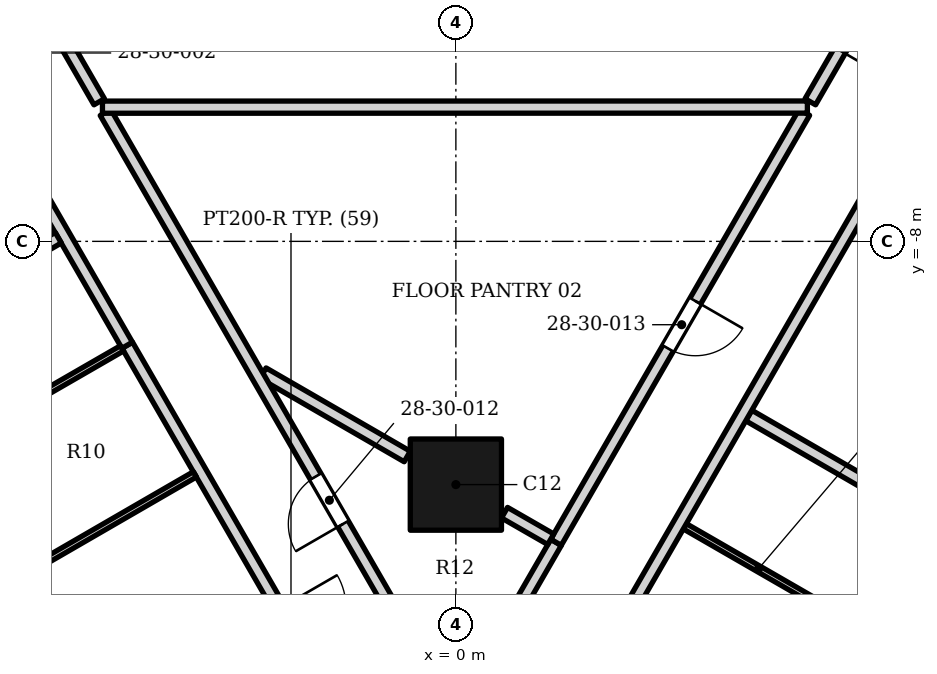
"""IFC4 building model, lengths in metres.
Left out: names, types, materials, properties, quantities, classifications, styles, units other than length and angle.
Written with IfcOpenShell. Run it as: python <this file> out.ifc"""

import sys

from ifc_helpers import new_model, si_unit, direction, frame, frame_2d, origin, origin_2d, place, context, subcontext, project, spatial, rectangle, extrude, element, fill, save


model = new_model("IFC4")
c1 = context("Model", 3, precision=1e-05, world=origin(), true_north=direction((0.0, 1.0)))
c2 = subcontext(c1, "Body", "Model", "MODEL_VIEW")
j1 = project(units=[si_unit("LENGTHUNIT", "METRE"), si_unit("PLANEANGLEUNIT", "RADIAN")], contexts=[c1])
p1 = place(None, origin())
s1 = spatial("IfcSite", under=j1, at=p1, CompositionType="ELEMENT")
p2 = place(p1, origin())
s2 = spatial("IfcBuilding", under=s1, at=p2, CompositionType="ELEMENT")
p3 = place(p2, frame((0.0, 0.0, 122.4)))
s3 = spatial("IfcBuildingStorey", under=s2, at=p3, CompositionType="ELEMENT", Elevation=122.4)
p4 = place(p3, frame((0.0, -12.0, 0.0), z_axis=(0.0, 0.0, 1.0), x_axis=(1.0, 0.0, 0.0)))
e1 = element("IfcColumn", 1, at=p4, inside=s3, PredefinedType="COLUMN", context=c2, shape_type="SweptSolid", body=[
    extrude(rectangle(XDim=1.5, YDim=1.5, at=origin_2d()), origin(), (0.0, 0.0, 1.0), 3.4),
])
p5 = place(p3, frame((-5.405, -9.708, 0.0), z_axis=(0.0, 0.0, 1.0), x_axis=(0.500010215181, -0.866019505967, 0.0)))
e2 = element("IfcWall", 2, at=p5, inside=s3, PredefinedType="PARTITIONING", context=c2, shape_type="SweptSolid", body=[
    extrude(rectangle(XDim=10.771, YDim=0.2, at=frame_2d((5.386, 0.0))), origin(), (0.0, 0.0, 1.0), 2.242),
])
p6 = place(p5, frame((5.0, 0.0, 0.0)))
e3 = element("IfcOpeningElement", 3, at=p6, cuts=e2, PredefinedType="OPENING", context=c2, shape_type="SweptSolid", body=[
    extrude(rectangle(XDim=1.1, YDim=2.1, at=frame_2d((0.55, 1.05))), frame((0.0, 0.11, 0.0), z_axis=(0.0, -1.0, 0.0), x_axis=(1.0, 0.0, 0.0)), (0.0, 0.0, 1.0), 0.22),
])
p7 = place(p5, frame((8.286, 0.0, 0.0)))
e4 = element("IfcOpeningElement", 4, at=p7, cuts=e2, PredefinedType="OPENING", context=c2, shape_type="SweptSolid", body=[
    extrude(rectangle(XDim=1.1, YDim=2.1, at=frame_2d((0.55, 1.05))), frame((0.0, 0.11, 0.0), z_axis=(0.0, -1.0, 0.0), x_axis=(1.0, 0.0, 0.0)), (0.0, 0.0, 1.0), 0.22),
])
p8 = place(p3, frame((0.033, -15.748, 0.0), z_axis=(0.0, 0.0, 1.0), x_axis=(0.50002566634, 0.866010584809, 0.0)))
e5 = element("IfcWall", 5, at=p8, inside=s3, PredefinedType="PARTITIONING", context=c2, shape_type="SweptSolid", body=[
    extrude(rectangle(XDim=3.229, YDim=0.2, at=frame_2d((1.615, 0.0))), origin(), (0.0, 0.0, 1.0), 2.474),
])
p9 = place(p3, frame((-8.49, -14.26, 0.0), z_axis=(0.0, 0.0, 1.0), x_axis=(0.86557903767, 0.500772333047, 0.0)))
e6 = element("IfcWall", 6, at=p9, inside=s3, PredefinedType="PARTITIONING", context=c2, shape_type="SweptSolid", body=[
    extrude(rectangle(XDim=4.85, YDim=0.1, at=frame_2d((2.425, 0.0))), origin(), (0.0, 0.0, 1.0), 2.242),
])
p10 = place(p9, frame((0.7, 0.0, 0.0)))
e7 = element("IfcOpeningElement", 7, at=p10, cuts=e6, PredefinedType="OPENING", context=c2, shape_type="SweptSolid", body=[
    extrude(rectangle(XDim=0.9, YDim=2.1, at=frame_2d((0.45, 1.05))), frame((0.0, 0.06, 0.0), z_axis=(0.0, -1.0, 0.0), x_axis=(1.0, 0.0, 0.0)), (0.0, 0.0, 1.0), 0.12),
])
p11 = place(p3, frame((3.764, -12.685, 0.0), z_axis=(0.0, 0.0, 1.0), x_axis=(0.866326367614, -0.499478352661, 0.0)))
e8 = element("IfcWall", 8, at=p11, inside=s3, PredefinedType="PARTITIONING", context=c2, shape_type="SweptSolid", body=[
    extrude(rectangle(XDim=2.8, YDim=0.1, at=frame_2d((1.4, 0.0))), origin(), (0.0, 0.0, 1.0), 2.384),
])
p12 = place(p3, frame((1.647, -12.948, 0.0), z_axis=(0.0, 0.0, 1.0), x_axis=(0.500209850425, 0.865904212681, 0.0)))
e9 = element("IfcWall", 9, at=p12, inside=s3, PredefinedType="PARTITIONING", context=c2, shape_type="SweptSolid", body=[
    extrude(rectangle(XDim=8.166, YDim=0.2, at=frame_2d((4.083, 0.0))), origin(), (0.0, 0.0, 1.0), 2.242),
])
p13 = place(p12, frame((3.682, 0.0, 0.0)))
e10 = element("IfcOpeningElement", 10, at=p13, cuts=e9, PredefinedType="OPENING", context=c2, shape_type="SweptSolid", body=[
    extrude(rectangle(XDim=0.9, YDim=2.1, at=frame_2d((0.45, 1.05))), frame((0.0, 0.11, 0.0), z_axis=(0.0, -1.0, 0.0), x_axis=(1.0, 0.0, 0.0)), (0.0, 0.0, 1.0), 0.22),
])
p14 = place(p3, frame((0.8, -12.462, 0.0), z_axis=(0.0, 0.0, 1.0), x_axis=(0.866903294585, -0.498476356347, 0.0)))
e11 = element("IfcWall", 11, at=p14, inside=s3, PredefinedType="PARTITIONING", context=c2, shape_type="SweptSolid", body=[
    extrude(rectangle(XDim=0.877, YDim=0.2, at=frame_2d((0.438, 0.0))), origin(), (0.0, 0.0, 1.0), 3.23),
])
p15 = place(p3, frame((4.816, -10.864, 0.0), z_axis=(0.0, 0.0, 1.0), x_axis=(0.865863825321, -0.500279757735, 0.0)))
e12 = element("IfcWall", 12, at=p15, inside=s3, PredefinedType="PARTITIONING", context=c2, shape_type="SweptSolid", body=[
    extrude(rectangle(XDim=5.65, YDim=0.2, at=frame_2d((2.825, 0.0))), origin(), (0.0, 0.0, 1.0), 2.242),
])
p16 = place(p3, frame((-3.171, -10.168, 0.0), z_axis=(0.0, 0.0, 1.0), x_axis=(0.865863357012, -0.500280568265, 0.0)))
e13 = element("IfcWall", 13, at=p16, inside=s3, PredefinedType="PARTITIONING", context=c2, shape_type="SweptSolid", body=[
    extrude(rectangle(XDim=2.739, YDim=0.2, at=frame_2d((1.369, 0.0))), origin(), (0.0, 0.0, 1.0), 2.242),
])
p17 = place(p3, frame((-7.914, -11.157, 0.0), z_axis=(0.0, 0.0, 1.0), x_axis=(0.866288634608, 0.499543793424, 0.0)))
e14 = element("IfcWall", 14, at=p17, inside=s3, PredefinedType="PARTITIONING", context=c2, shape_type="SweptSolid", body=[
    extrude(rectangle(XDim=2.8, YDim=0.1, at=frame_2d((1.4, 0.0))), origin(), (0.0, 0.0, 1.0), 2.242),
])
p18 = place(p3, frame((-13.143, 3.7, 0.0), z_axis=(0.0, 0.0, 1.0), x_axis=(0.499816656841, -0.866131231133, 0.0)))
e15 = element("IfcWall", 15, at=p18, inside=s3, PredefinedType="PARTITIONING", context=c2, shape_type="SweptSolid", body=[
    extrude(rectangle(XDim=15.48, YDim=0.2, at=frame_2d((7.74, 0.0))), origin(), (0.0, 0.0, 1.0), 2.242),
])
p19 = place(p18, frame((3.64, 0.0, 0.0)))
e16 = element("IfcOpeningElement", 16, at=p19, cuts=e15, PredefinedType="OPENING", context=c2, shape_type="SweptSolid", body=[
    extrude(rectangle(XDim=1.6, YDim=2.1, at=frame_2d((0.8, 1.05))), frame((0.0, 0.11, 0.0), z_axis=(0.0, -1.0, 0.0), x_axis=(1.0, 0.0, 0.0)), (0.0, 0.0, 1.0), 0.22),
])
p20 = place(p18, frame((9.381, 0.0, 0.0)))
e17 = element("IfcOpeningElement", 17, at=p20, cuts=e15, PredefinedType="OPENING", context=c2, shape_type="SweptSolid", body=[
    extrude(rectangle(XDim=1.1, YDim=2.1, at=frame_2d((0.55, 1.05))), frame((0.0, 0.11, 0.0), z_axis=(0.0, -1.0, 0.0), x_axis=(1.0, 0.0, 0.0)), (0.0, 0.0, 1.0), 0.22),
])
p21 = place(p3, frame((-10.74, -10.363, 0.0), z_axis=(0.0, 0.0, 1.0), x_axis=(0.866231677814, 0.499642552583, 0.0)))
e18 = element("IfcWall", 18, at=p21, inside=s3, PredefinedType="PARTITIONING", context=c2, shape_type="SweptSolid", body=[
    extrude(rectangle(XDim=4.85, YDim=0.2, at=frame_2d((2.425, 0.0))), origin(), (0.0, 0.0, 1.0), 2.242),
])
p22 = place(p3, frame((-5.763, -5.88, 0.0), z_axis=(0.0, 0.0, 1.0), x_axis=(0.500006842847, -0.866021453029, 0.0)))
e19 = element("IfcWall", 19, at=p22, inside=s3, PredefinedType="PARTITIONING", context=c2, shape_type="SweptSolid", body=[
    extrude(rectangle(XDim=11.493, YDim=0.2, at=frame_2d((5.747, 0.0))), origin(), (0.0, 0.0, 1.0), 2.242),
])
p23 = place(p22, frame((6.914, 0.0, 0.0)))
e20 = element("IfcOpeningElement", 20, at=p23, cuts=e19, PredefinedType="OPENING", context=c2, shape_type="SweptSolid", body=[
    extrude(rectangle(XDim=0.9, YDim=2.1, at=frame_2d((0.45, 1.05))), frame((0.0, 0.11, 0.0), z_axis=(0.0, -1.0, 0.0), x_axis=(1.0, 0.0, 0.0)), (0.0, 0.0, 1.0), 0.22),
])
p24 = place(p3, frame((-5.812, -5.793, 0.0), z_axis=(0.0, 0.0, 1.0), x_axis=(0.999999989135, 0.000147408763, 0.0)))
e21 = element("IfcWall", 21, at=p24, inside=s3, PredefinedType="PARTITIONING", context=c2, shape_type="SweptSolid", body=[
    extrude(rectangle(XDim=11.594, YDim=0.2, at=frame_2d((5.797, 0.0))), origin(), (0.0, 0.0, 1.0), 3.23),
])
p25 = place(p3, frame((5.829, -5.705, 0.0), z_axis=(0.0, 0.0, 1.0), x_axis=(0.500142759665, 0.865942965763, 0.0)))
e22 = element("IfcWall", 22, at=p25, inside=s3, PredefinedType="PARTITIONING", context=c2, shape_type="SweptSolid", body=[
    extrude(rectangle(XDim=10.86, YDim=0.2, at=frame_2d((5.43, 0.0))), origin(), (0.0, 0.0, 1.0), 2.242),
])
p26 = place(p25, frame((6.768, 0.0, 0.0)))
e23 = element("IfcOpeningElement", 23, at=p26, cuts=e22, PredefinedType="OPENING", context=c2, shape_type="SweptSolid", body=[
    extrude(rectangle(XDim=1.0, YDim=2.1, at=frame_2d((0.5, 1.05))), frame((0.0, 0.11, 0.0), z_axis=(0.0, -1.0, 0.0), x_axis=(1.0, 0.0, 0.0)), (0.0, 0.0, 1.0), 0.22),
])
p27 = place(p25, frame((3.563, 0.0, 0.0)))
e24 = element("IfcOpeningElement", 24, at=p27, cuts=e22, PredefinedType="OPENING", context=c2, shape_type="SweptSolid", body=[
    extrude(rectangle(XDim=1.0, YDim=2.1, at=frame_2d((0.5, 1.05))), frame((0.0, 0.11, 0.0), z_axis=(0.0, -1.0, 0.0), x_axis=(1.0, 0.0, 0.0)), (0.0, 0.0, 1.0), 0.22),
])
p28 = place(p3, frame((-11.295, 3.7, 0.0), z_axis=(0.0, 0.0, 1.0), x_axis=(0.500007885066, -0.866020851292, 0.0)))
e25 = element("IfcWall", 25, at=p28, inside=s3, PredefinedType="PARTITIONING", context=c2, shape_type="SweptSolid", body=[
    extrude(rectangle(XDim=10.859, YDim=0.2, at=frame_2d((5.43, 0.0))), origin(), (0.0, 0.0, 1.0), 2.242),
])
p29 = place(p3, frame((0.23, -18.61, 0.0), z_axis=(0.0, 0.0, 1.0), x_axis=(0.499999197515, 0.866025867099, 0.0)))
e26 = element("IfcWall", 26, at=p29, inside=s3, PredefinedType="PARTITIONING", context=c2, shape_type="SweptSolid", body=[
    extrude(rectangle(XDim=25.76, YDim=0.2, at=frame_2d((12.88, 0.0))), origin(), (0.0, 0.0, 1.0), 2.242),
])
p30 = place(p29, frame((0.8, 0.0, 0.0)))
e27 = element("IfcOpeningElement", 27, at=p30, cuts=e26, PredefinedType="OPENING", context=c2, shape_type="SweptSolid", body=[
    extrude(rectangle(XDim=1.1, YDim=2.1, at=frame_2d((0.55, 1.05))), frame((0.0, 0.11, 0.0), z_axis=(0.0, -1.0, 0.0), x_axis=(1.0, 0.0, 0.0)), (0.0, 0.0, 1.0), 0.22),
])
p31 = place(p29, frame((14.95, 0.0, 0.0)))
e28 = element("IfcOpeningElement", 28, at=p31, cuts=e26, PredefinedType="OPENING", context=c2, shape_type="SweptSolid", body=[
    extrude(rectangle(XDim=1.6, YDim=2.1, at=frame_2d((0.8, 1.05))), frame((0.0, 0.11, 0.0), z_axis=(0.0, -1.0, 0.0), x_axis=(1.0, 0.0, 0.0)), (0.0, 0.0, 1.0), 0.22),
])
p32 = place(p29, frame((23.58, 0.0, 0.0)))
e29 = element("IfcOpeningElement", 29, at=p32, cuts=e26, PredefinedType="OPENING", context=c2, shape_type="SweptSolid", body=[
    extrude(rectangle(XDim=1.1, YDim=2.1, at=frame_2d((0.55, 1.05))), frame((0.0, 0.11, 0.0), z_axis=(0.0, -1.0, 0.0), x_axis=(1.0, 0.0, 0.0)), (0.0, 0.0, 1.0), 0.22),
])
p33 = place(p23, origin())
e30 = element("IfcDoor", 30, at=p33, inside=s3, OperationType="SINGLE_SWING_RIGHT", PredefinedType="DOOR", context=c2, shape_type="SweptSolid", body=[
    extrude(rectangle(XDim=0.9, YDim=2.1, at=frame_2d((0.45, 1.05))), frame((0.0, 0.025, 0.0), z_axis=(0.0, -1.0, 0.0), x_axis=(1.0, 0.0, 0.0)), (0.0, 0.0, 1.0), 0.05),
])
fill(e20, e30)
p34 = place(p13, origin())
e31 = element("IfcDoor", 31, at=p34, inside=s3, OperationType="SINGLE_SWING_RIGHT", PredefinedType="DOOR", context=c2, shape_type="SweptSolid", body=[
    extrude(rectangle(XDim=0.9, YDim=2.1, at=frame_2d((0.45, 1.05))), frame((0.0, 0.025, 0.0), z_axis=(0.0, -1.0, 0.0), x_axis=(1.0, 0.0, 0.0)), (0.0, 0.0, 1.0), 0.05),
])
fill(e10, e31)
save(model, sys.argv[1])
